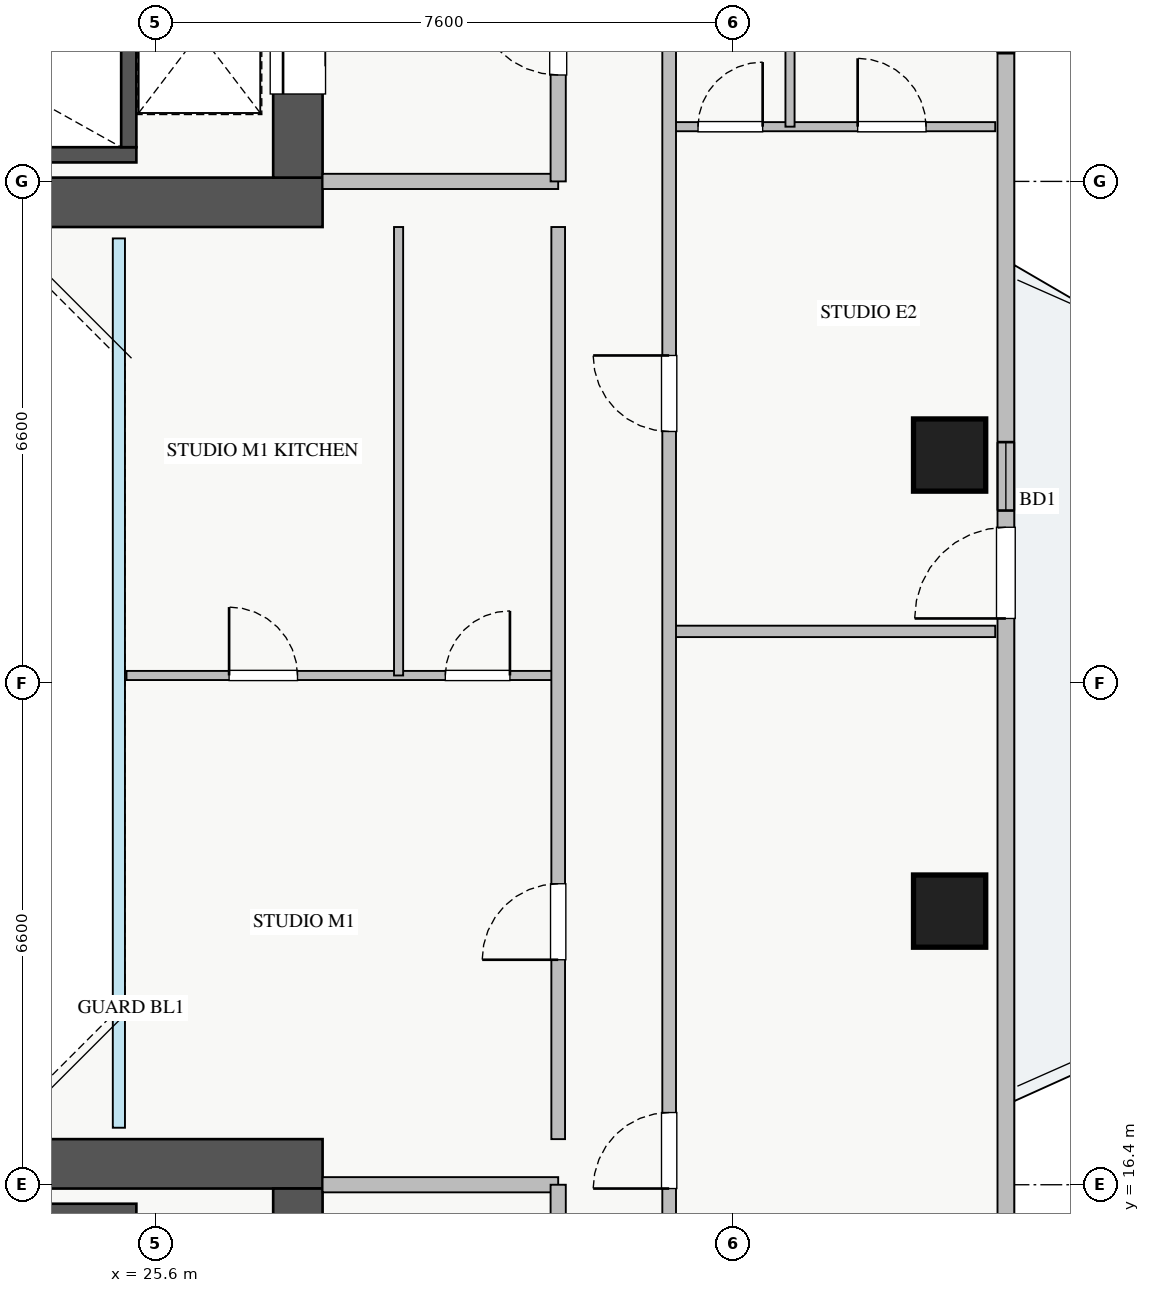
"""IFC4 building model, lengths in metres.
Left out: names, types, materials, properties, quantities, classifications, styles, units other than length and angle.
Written with IfcOpenShell. Run it as: python <this file> out.ifc"""

import sys

from ifc_helpers import new_model, si_unit, direction, frame, frame_2d, origin, origin_2d, place, context, subcontext, project, spatial, rectangle, extrude, source, transform, mapped, element, fill, save


model = new_model("IFC4")
c1 = context("Model", 3, precision=1e-05, world=origin(), true_north=direction((0.0, 1.0)))
c2 = subcontext(c1, "Body", "Model", "MODEL_VIEW")
j1 = project(units=[si_unit("LENGTHUNIT", "METRE"), si_unit("PLANEANGLEUNIT", "RADIAN")], contexts=[c1])
p1 = place(None, origin())
s1 = spatial("IfcSite", under=j1, at=p1, CompositionType="ELEMENT")
p2 = place(p1, origin())
s2 = spatial("IfcBuilding", under=s1, at=p2, CompositionType="ELEMENT")
p3 = place(p2, frame((0.0, 0.0, 147.0)))
s3 = spatial("IfcBuildingStorey", under=s2, at=p3, CompositionType="ELEMENT", Elevation=147.0)
p4 = place(p3, frame((18.2, 29.95, 0.0), z_axis=(0.0, 0.0, 1.0), x_axis=(1.0, 0.0, 0.0)))
e1 = element("IfcWall", 1, at=p4, inside=s3, PredefinedType="SHEAR", context=c2, shape_type="SweptSolid", body=[
    extrude(rectangle(XDim=7.15, YDim=0.2, at=frame_2d((3.575, 0.0))), origin(), (0.0, 0.0, 1.0), 3.25),
])
p5 = place(p3, frame((25.25, 30.05, 0.0), z_axis=(0.0, 0.0, 1.0), x_axis=(0.0, 1.0, 0.0)))
e2 = element("IfcWall", 2, at=p5, inside=s3, PredefinedType="SHEAR", context=c2, shape_type="SweptSolid", body=[
    extrude(rectangle(XDim=2.94, YDim=0.2, at=frame_2d((1.47, 0.0))), origin(), (0.0, 0.0, 1.0), 3.25),
])
p6 = place(p3, frame((18.2, 16.05, 0.0), z_axis=(0.0, 0.0, 1.0), x_axis=(1.0, 0.0, 0.0)))
e3 = element("IfcWall", 3, at=p6, inside=s3, PredefinedType="SHEAR", context=c2, shape_type="SweptSolid", body=[
    extrude(rectangle(XDim=7.15, YDim=0.2, at=frame_2d((3.575, 0.0))), origin(), (0.0, 0.0, 1.0), 3.25),
])
p7 = place(p3, frame((10.2, 29.325, 0.0), z_axis=(0.0, 0.0, 1.0), x_axis=(1.0, 0.0, 0.0)))
e4 = element("IfcWall", 4, at=p7, inside=s3, PredefinedType="SHEAR", context=c2, shape_type="SweptSolid", body=[
    extrude(rectangle(XDim=17.6, YDim=0.65, at=frame_2d((8.8, 0.0))), origin(), (0.0, 0.0, 1.0), 3.25),
])
p8 = place(p3, frame((27.475, 29.65, 0.0), z_axis=(0.0, 0.0, 1.0), x_axis=(0.0, 1.0, 0.0)))
e5 = element("IfcWall", 5, at=p8, inside=s3, PredefinedType="SHEAR", context=c2, shape_type="SweptSolid", body=[
    extrude(rectangle(XDim=5.9, YDim=0.65, at=frame_2d((2.95, 0.0))), origin(), (0.0, 0.0, 1.0), 3.25),
])
p9 = place(p8, frame((1.1, 0.0, 0.0)))
e6 = element("IfcOpeningElement", 6, at=p9, cuts=e5, PredefinedType="OPENING", context=c2, shape_type="SweptSolid", body=[
    extrude(rectangle(XDim=1.3, YDim=2.05, at=frame_2d((0.65, 1.025))), frame((0.0, 0.335, 0.0), z_axis=(0.0, -1.0, 0.0), x_axis=(1.0, 0.0, 0.0)), (0.0, 0.0, 1.0), 0.67),
])
p10 = place(p3, frame((10.2, 16.675, 0.0), z_axis=(0.0, 0.0, 1.0), x_axis=(1.0, 0.0, 0.0)))
e7 = element("IfcWall", 7, at=p10, inside=s3, PredefinedType="SHEAR", context=c2, shape_type="SweptSolid", body=[
    extrude(rectangle(XDim=17.6, YDim=0.65, at=frame_2d((8.8, 0.0))), origin(), (0.0, 0.0, 1.0), 3.25),
])
p11 = place(p3, frame((27.475, 10.45, 0.0), z_axis=(0.0, 0.0, 1.0), x_axis=(0.0, 1.0, 0.0)))
e8 = element("IfcWall", 8, at=p11, inside=s3, PredefinedType="SHEAR", context=c2, shape_type="SweptSolid", body=[
    extrude(rectangle(XDim=5.9, YDim=0.65, at=frame_2d((2.95, 0.0))), origin(), (0.0, 0.0, 1.0), 3.25),
])
p12 = place(p11, frame((2.1, 0.0, 0.0)))
e9 = element("IfcOpeningElement", 9, at=p12, cuts=e8, PredefinedType="OPENING", context=c2, shape_type="SweptSolid", body=[
    extrude(rectangle(XDim=1.3, YDim=2.05, at=frame_2d((0.65, 1.025))), frame((0.0, 0.335, 0.0), z_axis=(0.0, -1.0, 0.0), x_axis=(1.0, 0.0, 0.0)), (0.0, 0.0, 1.0), 0.67),
])
m1 = source(origin(), c2, "Body", "SweptSolid", [
    extrude(rectangle(XDim=0.95, YDim=0.95, at=origin_2d()), origin(), (0.0, 0.0, 1.0), 3.25),
])
for number, where, z_axis, x_axis in (
    (10, (36.05, 20.0, 0.0), (0.0, 0.0, 1.0), (1.0, 0.0, 0.0)),
    (11, (36.05, 26.0, 0.0), (0.0, 0.0, 1.0), (1.0, 0.0, 0.0)),
):
    element("IfcColumn", number, at=place(p3, frame(where, z_axis=z_axis, x_axis=x_axis)), inside=s3, PredefinedType="COLUMN", context=c2, shape_type="MappedRepresentation", body=[
        mapped(m1, transform((0.0, 0.0, 0.0), x_axis=(1.0, 0.0, 0.0), y_axis=(0.0, 1.0, 0.0), z_axis=(0.0, 0.0, 1.0), scale=1.0)),
    ])
p13 = place(p3, frame((36.79, 10.55, 0.0), z_axis=(0.0, 0.0, 1.0), x_axis=(0.0, 1.0, 0.0)))
e12 = element("IfcWall", 12, at=p13, inside=s3, PredefinedType="STANDARD", context=c2, shape_type="SweptSolid", body=[
    extrude(rectangle(XDim=24.9, YDim=0.22, at=frame_2d((12.45, 0.0))), origin(), (0.0, 0.0, 1.0), 2.61),
])
p14 = place(p13, frame((13.3, 0.0, 0.0)))
e13 = element("IfcOpeningElement", 13, at=p14, cuts=e12, PredefinedType="OPENING", context=c2, shape_type="SweptSolid", body=[
    extrude(rectangle(XDim=1.2, YDim=2.1, at=frame_2d((0.6, 1.05))), frame((0.0, 0.12, 0.0), z_axis=(0.0, -1.0, 0.0), x_axis=(1.0, 0.0, 0.0)), (0.0, 0.0, 1.0), 0.24),
])
p15 = place(p13, frame((1.912, 0.0, 0.9)))
e14 = element("IfcOpeningElement", 14, at=p15, cuts=e12, PredefinedType="OPENING", context=c2, shape_type="SweptSolid", body=[
    extrude(rectangle(XDim=2.4, YDim=1.48, at=frame_2d((1.2, 0.74))), frame((0.0, 0.12, 0.0), z_axis=(0.0, -1.0, 0.0), x_axis=(1.0, 0.0, 0.0)), (0.0, 0.0, 1.0), 0.24),
])
p16 = place(p13, frame((20.737, 0.0, 0.9)))
e15 = element("IfcOpeningElement", 15, at=p16, cuts=e12, PredefinedType="OPENING", context=c2, shape_type="SweptSolid", body=[
    extrude(rectangle(XDim=2.1, YDim=1.48, at=frame_2d((1.05, 0.74))), frame((0.0, 0.12, 0.0), z_axis=(0.0, -1.0, 0.0), x_axis=(1.0, 0.0, 0.0)), (0.0, 0.0, 1.0), 0.24),
])
p17 = place(p13, frame((14.72, 0.0, 0.9)))
e16 = element("IfcOpeningElement", 16, at=p17, cuts=e12, PredefinedType="OPENING", context=c2, shape_type="SweptSolid", body=[
    extrude(rectangle(XDim=0.9, YDim=1.2, at=frame_2d((0.45, 0.6))), frame((0.0, 0.12, 0.0), z_axis=(0.0, -1.0, 0.0), x_axis=(1.0, 0.0, 0.0)), (0.0, 0.0, 1.0), 0.24),
])
p18 = place(p3, frame((27.8, 29.6, 0.0), z_axis=(0.0, 0.0, 1.0), x_axis=(1.0, 0.0, 0.0)))
e17 = element("IfcWall", 17, at=p18, inside=s3, PredefinedType="PARTITIONING", context=c2, shape_type="SweptSolid", body=[
    extrude(rectangle(XDim=3.1, YDim=0.2, at=frame_2d((1.55, 0.0))), origin(), (0.0, 0.0, 1.0), 3.07),
])
p19 = place(p3, frame((30.9, 29.6, 0.0), z_axis=(0.0, 0.0, 1.0), x_axis=(0.0, 1.0, 0.0)))
e18 = element("IfcWall", 18, at=p19, inside=s3, PredefinedType="PARTITIONING", context=c2, shape_type="SweptSolid", body=[
    extrude(rectangle(XDim=3.9, YDim=0.2, at=frame_2d((1.95, 0.0))), origin(), (0.0, 0.0, 1.0), 3.07),
])
p20 = place(p19, frame((1.4, 0.0, 0.0)))
e19 = element("IfcOpeningElement", 19, at=p20, cuts=e18, PredefinedType="OPENING", context=c2, shape_type="SweptSolid", body=[
    extrude(rectangle(XDim=1.1, YDim=2.05, at=frame_2d((0.55, 1.025))), frame((0.0, 0.11, 0.0), z_axis=(0.0, -1.0, 0.0), x_axis=(1.0, 0.0, 0.0)), (0.0, 0.0, 1.0), 0.22),
])
p21 = place(p3, frame((27.8, 16.4, 0.0), z_axis=(0.0, 0.0, 1.0), x_axis=(1.0, 0.0, 0.0)))
e20 = element("IfcWall", 20, at=p21, inside=s3, PredefinedType="PARTITIONING", context=c2, shape_type="SweptSolid", body=[
    extrude(rectangle(XDim=3.1, YDim=0.2, at=frame_2d((1.55, 0.0))), origin(), (0.0, 0.0, 1.0), 3.07),
])
p22 = place(p3, frame((30.9, 12.5, 0.0), z_axis=(0.0, 0.0, 1.0), x_axis=(0.0, 1.0, 0.0)))
e21 = element("IfcWall", 21, at=p22, inside=s3, PredefinedType="PARTITIONING", context=c2, shape_type="SweptSolid", body=[
    extrude(rectangle(XDim=3.9, YDim=0.2, at=frame_2d((1.95, 0.0))), origin(), (0.0, 0.0, 1.0), 3.07),
])
p23 = place(p22, frame((1.4, 0.0, 0.0)))
e22 = element("IfcOpeningElement", 22, at=p23, cuts=e21, PredefinedType="OPENING", context=c2, shape_type="SweptSolid", body=[
    extrude(rectangle(XDim=1.1, YDim=2.05, at=frame_2d((0.55, 1.025))), frame((0.0, 0.11, 0.0), z_axis=(0.0, -1.0, 0.0), x_axis=(1.0, 0.0, 0.0)), (0.0, 0.0, 1.0), 0.22),
])
p24 = place(p3, frame((32.36, 30.32, 0.0), z_axis=(0.0, 0.0, 1.0), x_axis=(1.0, 0.0, 0.0)))
e23 = element("IfcWall", 23, at=p24, inside=s3, PredefinedType="PLUMBINGWALL", context=c2, shape_type="SweptSolid", body=[
    extrude(rectangle(XDim=4.29, YDim=0.12, at=frame_2d((2.145, 0.0))), origin(), (0.0, 0.0, 1.0), 3.07),
])
p25 = place(p24, frame((0.38, 0.0, 0.0)))
e24 = element("IfcOpeningElement", 24, at=p25, cuts=e23, PredefinedType="OPENING", context=c2, shape_type="SweptSolid", body=[
    extrude(rectangle(XDim=0.85, YDim=2.05, at=frame_2d((0.425, 1.025))), frame((0.0, 0.07, 0.0), z_axis=(0.0, -1.0, 0.0), x_axis=(1.0, 0.0, 0.0)), (0.0, 0.0, 1.0), 0.14),
])
p26 = place(p24, frame((2.48, 0.0, 0.0)))
e25 = element("IfcOpeningElement", 25, at=p26, cuts=e23, PredefinedType="OPENING", context=c2, shape_type="SweptSolid", body=[
    extrude(rectangle(XDim=0.9, YDim=2.05, at=frame_2d((0.45, 1.025))), frame((0.0, 0.07, 0.0), z_axis=(0.0, -1.0, 0.0), x_axis=(1.0, 0.0, 0.0)), (0.0, 0.0, 1.0), 0.14),
])
p27 = place(p3, frame((33.95, 30.32, 0.0), z_axis=(0.0, 0.0, 1.0), x_axis=(0.0, 1.0, 0.0)))
e26 = element("IfcWall", 26, at=p27, inside=s3, PredefinedType="PLUMBINGWALL", context=c2, shape_type="SweptSolid", body=[
    extrude(rectangle(XDim=5.66, YDim=0.12, at=frame_2d((2.83, 0.0))), origin(), (0.0, 0.0, 1.0), 3.07),
])
p28 = place(p3, frame((32.36, 23.68, 0.0), z_axis=(0.0, 0.0, 1.0), x_axis=(1.0, 0.0, 0.0)))
e27 = element("IfcWall", 27, at=p28, inside=s3, PredefinedType="PARTITIONING", context=c2, shape_type="SweptSolid", body=[
    extrude(rectangle(XDim=4.29, YDim=0.15, at=frame_2d((2.145, 0.0))), origin(), (0.0, 0.0, 1.0), 3.07),
])
p29 = place(p3, frame((32.36, 8.3, 0.0), z_axis=(0.0, 0.0, 1.0), x_axis=(0.0, 1.0, 0.0)))
e28 = element("IfcWall", 28, at=p29, inside=s3, PredefinedType="PARTITIONING", context=c2, shape_type="SweptSolid", body=[
    extrude(rectangle(XDim=29.4, YDim=0.18, at=frame_2d((14.7, 0.0))), origin(), (0.0, 0.0, 1.0), 3.07),
])
p30 = place(p29, frame((28.08, 0.0, 0.0)))
e29 = element("IfcOpeningElement", 29, at=p30, cuts=e28, PredefinedType="OPENING", context=c2, shape_type="SweptSolid", body=[
    extrude(rectangle(XDim=0.9, YDim=2.05, at=frame_2d((0.45, 1.025))), frame((0.0, 0.1, 0.0), z_axis=(0.0, -1.0, 0.0), x_axis=(1.0, 0.0, 0.0)), (0.0, 0.0, 1.0), 0.2),
])
p31 = place(p29, frame((0.42, 0.0, 0.0)))
e30 = element("IfcOpeningElement", 30, at=p31, cuts=e28, PredefinedType="OPENING", context=c2, shape_type="SweptSolid", body=[
    extrude(rectangle(XDim=0.9, YDim=2.05, at=frame_2d((0.45, 1.025))), frame((0.0, 0.1, 0.0), z_axis=(0.0, -1.0, 0.0), x_axis=(1.0, 0.0, 0.0)), (0.0, 0.0, 1.0), 0.2),
])
p32 = place(p29, frame((8.05, 0.0, 0.0)))
e31 = element("IfcOpeningElement", 31, at=p32, cuts=e28, PredefinedType="OPENING", context=c2, shape_type="SweptSolid", body=[
    extrude(rectangle(XDim=1.0, YDim=2.05, at=frame_2d((0.5, 1.025))), frame((0.0, 0.1, 0.0), z_axis=(0.0, -1.0, 0.0), x_axis=(1.0, 0.0, 0.0)), (0.0, 0.0, 1.0), 0.2),
])
p33 = place(p29, frame((18.01, 0.0, 0.0)))
e32 = element("IfcOpeningElement", 32, at=p33, cuts=e28, PredefinedType="OPENING", context=c2, shape_type="SweptSolid", body=[
    extrude(rectangle(XDim=1.0, YDim=2.05, at=frame_2d((0.5, 1.025))), frame((0.0, 0.1, 0.0), z_axis=(0.0, -1.0, 0.0), x_axis=(1.0, 0.0, 0.0)), (0.0, 0.0, 1.0), 0.2),
])
p34 = place(p3, frame((25.22, 23.1, 0.0), z_axis=(0.0, 0.0, 1.0), x_axis=(1.0, 0.0, 0.0)))
e33 = element("IfcWall", 33, at=p34, inside=s3, PredefinedType="PLUMBINGWALL", context=c2, shape_type="SweptSolid", body=[
    extrude(rectangle(XDim=5.68, YDim=0.12, at=frame_2d((2.84, 0.0))), origin(), (0.0, 0.0, 1.0), 3.07),
])
p35 = place(p34, frame((1.35, 0.0, 0.0)))
e34 = element("IfcOpeningElement", 34, at=p35, cuts=e33, PredefinedType="OPENING", context=c2, shape_type="SweptSolid", body=[
    extrude(rectangle(XDim=0.9, YDim=2.05, at=frame_2d((0.45, 1.025))), frame((0.0, 0.07, 0.0), z_axis=(0.0, -1.0, 0.0), x_axis=(1.0, 0.0, 0.0)), (0.0, 0.0, 1.0), 0.14),
])
p36 = place(p34, frame((4.195, 0.0, 0.0)))
e35 = element("IfcOpeningElement", 35, at=p36, cuts=e33, PredefinedType="OPENING", context=c2, shape_type="SweptSolid", body=[
    extrude(rectangle(XDim=0.85, YDim=2.05, at=frame_2d((0.425, 1.025))), frame((0.0, 0.07, 0.0), z_axis=(0.0, -1.0, 0.0), x_axis=(1.0, 0.0, 0.0)), (0.0, 0.0, 1.0), 0.14),
])
p37 = place(p3, frame((28.8, 23.1, 0.0), z_axis=(0.0, 0.0, 1.0), x_axis=(0.0, 1.0, 0.0)))
e36 = element("IfcWall", 36, at=p37, inside=s3, PredefinedType="PLUMBINGWALL", context=c2, shape_type="SweptSolid", body=[
    extrude(rectangle(XDim=5.9, YDim=0.12, at=frame_2d((2.95, 0.0))), origin(), (0.0, 0.0, 1.0), 3.07),
])
p38 = place(p3, frame((30.9, 17.0, 0.0), z_axis=(0.0, 0.0, 1.0), x_axis=(0.0, 1.0, 0.0)))
e37 = element("IfcWall", 37, at=p38, inside=s3, PredefinedType="PARTITIONING", context=c2, shape_type="SweptSolid", body=[
    extrude(rectangle(XDim=12.0, YDim=0.18, at=frame_2d((6.0, 0.0))), origin(), (0.0, 0.0, 1.0), 3.07),
])
p39 = place(p38, frame((2.36, 0.0, 0.0)))
e38 = element("IfcOpeningElement", 38, at=p39, cuts=e37, PredefinedType="OPENING", context=c2, shape_type="SweptSolid", body=[
    extrude(rectangle(XDim=1.0, YDim=2.05, at=frame_2d((0.5, 1.025))), frame((0.0, 0.1, 0.0), z_axis=(0.0, -1.0, 0.0), x_axis=(1.0, 0.0, 0.0)), (0.0, 0.0, 1.0), 0.2),
])
m2 = source(origin(), c2, "Body", "SweptSolid", [
    extrude(rectangle(XDim=1.2, YDim=2.1, at=frame_2d((0.6, 1.05))), frame((0.0, 0.025, 0.0), z_axis=(0.0, -1.0, 0.0), x_axis=(1.0, 0.0, 0.0)), (0.0, 0.0, 1.0), 0.05),
])
p40 = place(p14, origin())
e39 = element("IfcDoor", 39, at=p40, inside=s3, OperationType="SINGLE_SWING_LEFT", PredefinedType="DOOR", context=c2, shape_type="MappedRepresentation", body=[
    mapped(m2, transform((0.0, 0.0, 0.0), x_axis=(1.0, 0.0, 0.0), y_axis=(0.0, 1.0, 0.0), z_axis=(0.0, 0.0, 1.0), scale=1.0)),
])
fill(e13, e39)
m3 = source(origin(), c2, "Body", "SweptSolid", [
    extrude(rectangle(XDim=2.1, YDim=1.48, at=frame_2d((1.05, 0.74))), frame((0.0, 0.03, 0.0), z_axis=(0.0, -1.0, 0.0), x_axis=(1.0, 0.0, 0.0)), (0.0, 0.0, 1.0), 0.06),
])
p41 = place(p16, origin())
e40 = element("IfcWindow", 40, at=p41, inside=s3, PartitioningType="TRIPLE_PANEL_VERTICAL", PredefinedType="WINDOW", context=c2, shape_type="MappedRepresentation", body=[
    mapped(m3, transform((0.0, 0.0, 0.0), x_axis=(1.0, 0.0, 0.0), y_axis=(0.0, 1.0, 0.0), z_axis=(0.0, 0.0, 1.0), scale=1.0)),
])
fill(e15, e40)
m4 = source(origin(), c2, "Body", "SweptSolid", [
    extrude(rectangle(XDim=1.3, YDim=2.05, at=frame_2d((0.65, 1.025))), frame((0.0, 0.025, 0.0), z_axis=(0.0, -1.0, 0.0), x_axis=(1.0, 0.0, 0.0)), (0.0, 0.0, 1.0), 0.05),
])
p42 = place(p9, origin())
e41 = element("IfcDoor", 41, at=p42, inside=s3, OperationType="SLIDING_TO_LEFT", PredefinedType="DOOR", context=c2, shape_type="MappedRepresentation", body=[
    mapped(m4, transform((0.0, 0.0, 0.0), x_axis=(1.0, 0.0, 0.0), y_axis=(0.0, 1.0, 0.0), z_axis=(0.0, 0.0, 1.0), scale=1.0)),
])
fill(e6, e41)
m5 = source(origin(), c2, "Body", "SweptSolid", [
    extrude(rectangle(XDim=1.1, YDim=2.05, at=frame_2d((0.55, 1.025))), frame((0.0, 0.025, 0.0), z_axis=(0.0, -1.0, 0.0), x_axis=(1.0, 0.0, 0.0)), (0.0, 0.0, 1.0), 0.05),
])
p43 = place(p20, origin())
e42 = element("IfcDoor", 42, at=p43, inside=s3, OperationType="SINGLE_SWING_RIGHT", PredefinedType="DOOR", context=c2, shape_type="MappedRepresentation", body=[
    mapped(m5, transform((0.0, 0.0, 0.0), x_axis=(1.0, 0.0, 0.0), y_axis=(0.0, 1.0, 0.0), z_axis=(0.0, 0.0, 1.0), scale=1.0)),
])
fill(e19, e42)
m6 = source(origin(), c2, "Body", "SweptSolid", [
    extrude(rectangle(XDim=0.85, YDim=2.05, at=frame_2d((0.425, 1.025))), frame((0.0, 0.025, 0.0), z_axis=(0.0, -1.0, 0.0), x_axis=(1.0, 0.0, 0.0)), (0.0, 0.0, 1.0), 0.05),
])
p44 = place(p25, origin())
e43 = element("IfcDoor", 43, at=p44, inside=s3, OperationType="SINGLE_SWING_RIGHT", PredefinedType="DOOR", context=c2, shape_type="MappedRepresentation", body=[
    mapped(m6, transform((0.0, 0.0, 0.0), x_axis=(1.0, 0.0, 0.0), y_axis=(0.0, 1.0, 0.0), z_axis=(0.0, 0.0, 1.0), scale=1.0)),
])
fill(e24, e43)
m7 = source(origin(), c2, "Body", "SweptSolid", [
    extrude(rectangle(XDim=0.9, YDim=2.05, at=frame_2d((0.45, 1.025))), frame((0.0, 0.025, 0.0), z_axis=(0.0, -1.0, 0.0), x_axis=(1.0, 0.0, 0.0)), (0.0, 0.0, 1.0), 0.05),
])
p45 = place(p26, origin())
e44 = element("IfcDoor", 44, at=p45, inside=s3, OperationType="SINGLE_SWING_LEFT", PredefinedType="DOOR", context=c2, shape_type="MappedRepresentation", body=[
    mapped(m7, transform((0.0, 0.0, 0.0), x_axis=(1.0, 0.0, 0.0), y_axis=(0.0, 1.0, 0.0), z_axis=(0.0, 0.0, 1.0), scale=1.0)),
])
fill(e25, e44)
m8 = source(origin(), c2, "Body", "SweptSolid", [
    extrude(rectangle(XDim=1.0, YDim=2.05, at=frame_2d((0.5, 1.025))), frame((0.0, 0.025, 0.0), z_axis=(0.0, -1.0, 0.0), x_axis=(1.0, 0.0, 0.0)), (0.0, 0.0, 1.0), 0.05),
])
p46 = place(p32, origin())
e45 = element("IfcDoor", 45, at=p46, inside=s3, OperationType="SINGLE_SWING_LEFT", PredefinedType="DOOR", context=c2, shape_type="MappedRepresentation", body=[
    mapped(m8, transform((0.0, 0.0, 0.0), x_axis=(1.0, 0.0, 0.0), y_axis=(0.0, 1.0, 0.0), z_axis=(0.0, 0.0, 1.0), scale=1.0)),
])
fill(e31, e45)
p47 = place(p33, origin())
e46 = element("IfcDoor", 46, at=p47, inside=s3, OperationType="SINGLE_SWING_RIGHT", PredefinedType="DOOR", context=c2, shape_type="MappedRepresentation", body=[
    mapped(m8, transform((0.0, 0.0, 0.0), x_axis=(1.0, 0.0, 0.0), y_axis=(0.0, 1.0, 0.0), z_axis=(0.0, 0.0, 1.0), scale=1.0)),
])
fill(e32, e46)
p48 = place(p35, origin())
e47 = element("IfcDoor", 47, at=p48, inside=s3, OperationType="SINGLE_SWING_LEFT", PredefinedType="DOOR", context=c2, shape_type="MappedRepresentation", body=[
    mapped(m7, transform((0.0, 0.0, 0.0), x_axis=(1.0, 0.0, 0.0), y_axis=(0.0, 1.0, 0.0), z_axis=(0.0, 0.0, 1.0), scale=1.0)),
])
fill(e34, e47)
p49 = place(p36, origin())
e48 = element("IfcDoor", 48, at=p49, inside=s3, OperationType="SINGLE_SWING_RIGHT", PredefinedType="DOOR", context=c2, shape_type="MappedRepresentation", body=[
    mapped(m6, transform((0.0, 0.0, 0.0), x_axis=(1.0, 0.0, 0.0), y_axis=(0.0, 1.0, 0.0), z_axis=(0.0, 0.0, 1.0), scale=1.0)),
])
fill(e35, e48)
p50 = place(p39, origin())
e49 = element("IfcDoor", 49, at=p50, inside=s3, OperationType="SINGLE_SWING_LEFT", PredefinedType="DOOR", context=c2, shape_type="MappedRepresentation", body=[
    mapped(m8, transform((0.0, 0.0, 0.0), x_axis=(1.0, 0.0, 0.0), y_axis=(0.0, 1.0, 0.0), z_axis=(0.0, 0.0, 1.0), scale=1.0)),
])
fill(e38, e49)
m9 = source(origin(), c2, "Body", "SweptSolid", [
    extrude(rectangle(XDim=0.9, YDim=1.2, at=frame_2d((0.45, 0.6))), frame((0.0, 0.03, 0.0), z_axis=(0.0, -1.0, 0.0), x_axis=(1.0, 0.0, 0.0)), (0.0, 0.0, 1.0), 0.06),
])
p51 = place(p17, origin())
e50 = element("IfcWindow", 50, at=p51, inside=s3, PartitioningType="SINGLE_PANEL", PredefinedType="WINDOW", context=c2, shape_type="MappedRepresentation", body=[
    mapped(m9, transform((0.0, 0.0, 0.0), x_axis=(1.0, 0.0, 0.0), y_axis=(0.0, 1.0, 0.0), z_axis=(0.0, 0.0, 1.0), scale=1.0)),
])
fill(e16, e50)
save(model, sys.argv[1])
